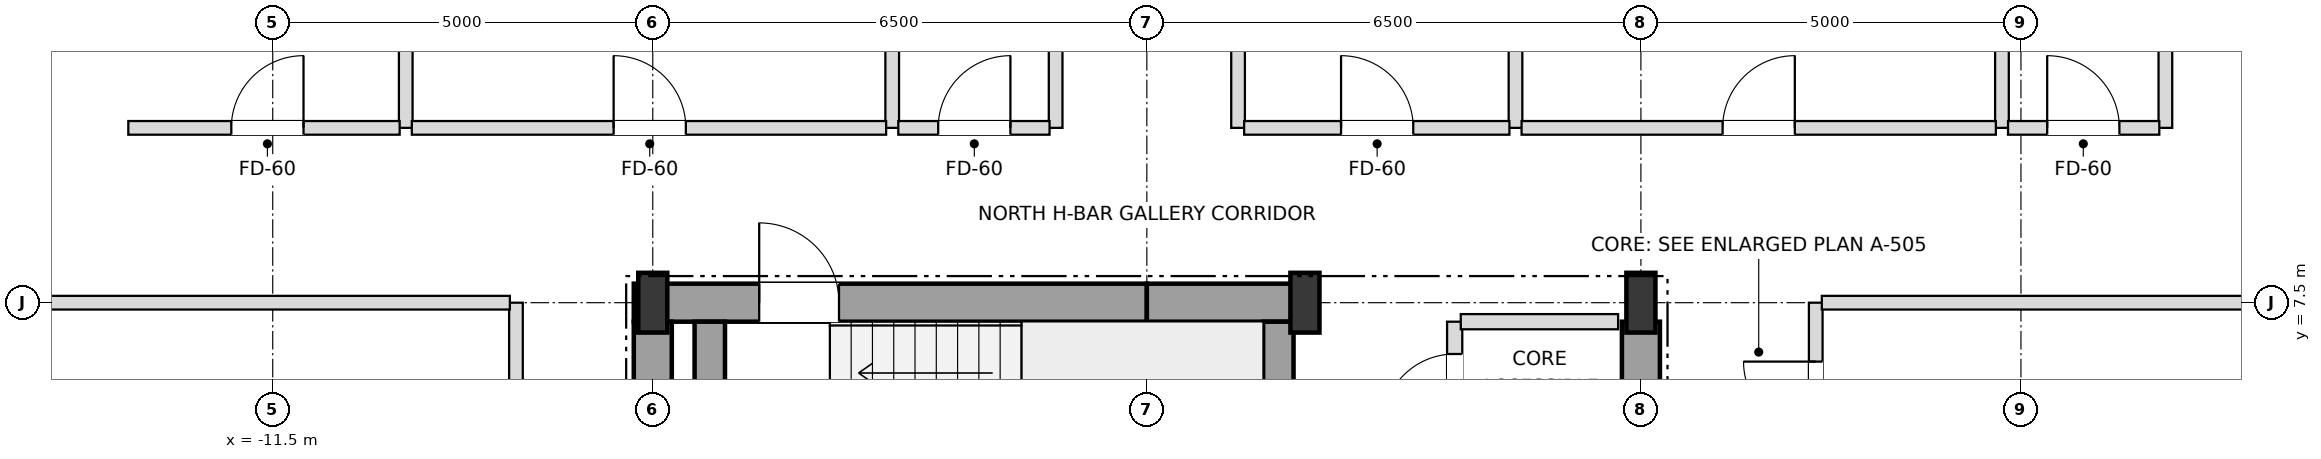
"""IFC4 building model, lengths in metres.
Left out: names, types, materials, properties, quantities, classifications, styles, units other than length and angle.
Written with IfcOpenShell. Run it as: python <this file> out.ifc"""

import sys

from ifc_helpers import new_model, si_unit, direction, frame, frame_2d, origin, origin_2d, place, context, subcontext, project, spatial, rectangle, i_section, extrude, element, fill, save


model = new_model("IFC4")
c1 = context("Model", 3, precision=1e-05, world=origin(), true_north=direction((0.0, 1.0)))
c2 = subcontext(c1, "Body", "Model", "MODEL_VIEW")
j1 = project(units=[si_unit("LENGTHUNIT", "METRE"), si_unit("PLANEANGLEUNIT", "RADIAN")], contexts=[c1])
p1 = place(None, origin())
s1 = spatial("IfcSite", under=j1, at=p1, CompositionType="ELEMENT")
p2 = place(p1, origin())
s2 = spatial("IfcBuilding", under=s1, at=p2, CompositionType="ELEMENT")
p3 = place(p2, frame((0.0, 0.0, 205.2)))
s3 = spatial("IfcBuildingStorey", under=s2, at=p3, CompositionType="ELEMENT", Elevation=205.2)
for number, where, z_axis, x_axis in (
    (1, (-6.5, 7.5, 0.0), (0.0, 0.0, 1.0), (1.0, 0.0, 0.0)),
    (2, (2.08, 7.5, 0.0), (0.0, 0.0, 1.0), (1.0, 0.0, 0.0)),
    (3, (6.5, 7.5, 0.0), (0.0, 0.0, 1.0), (1.0, 0.0, 0.0)),
):
    element("IfcColumn", number, at=place(p3, frame(where, z_axis=z_axis, x_axis=x_axis)), inside=s3, PredefinedType="COLUMN", context=c2, shape_type="SweptSolid", body=[
        extrude(i_section(OverallWidth=0.382, OverallDepth=0.786, WebThickness=0.02, FlangeThickness=0.033, at=origin_2d()), origin(), (0.0, 0.0, 1.0), 3.6),
    ])
p4 = place(p3, frame((-6.75, 7.5, 0.0), z_axis=(0.0, 0.0, 1.0), x_axis=(1.0, 0.0, 0.0)))
e4 = element("IfcWall", 4, at=p4, inside=s3, PredefinedType="SHEAR", context=c2, shape_type="SweptSolid", body=[
    extrude(rectangle(XDim=6.75, YDim=0.5, at=frame_2d((3.375, 0.0))), origin(), (0.0, 0.0, 1.0), 3.38),
])
p5 = place(p4, frame((1.65, 0.0, 0.0)))
e5 = element("IfcOpeningElement", 5, at=p5, cuts=e4, PredefinedType="OPENING", context=c2, shape_type="SweptSolid", body=[
    extrude(rectangle(XDim=1.05, YDim=2.15, at=frame_2d((0.525, 1.075))), frame((0.0, 0.26, 0.0), z_axis=(0.0, -1.0, 0.0), x_axis=(1.0, 0.0, 0.0)), (0.0, 0.0, 1.0), 0.52),
])
p6 = place(p3, frame((0.0, 7.5, 0.0), z_axis=(0.0, 0.0, 1.0), x_axis=(1.0, 0.0, 0.0)))
e6 = element("IfcWall", 6, at=p6, inside=s3, PredefinedType="SHEAR", context=c2, shape_type="SweptSolid", body=[
    extrude(rectangle(XDim=2.08, YDim=0.5, at=frame_2d((1.04, 0.0))), origin(), (0.0, 0.0, 1.0), 3.38),
])
for number, where, z_axis, x_axis in (
    (7, (-6.5, 3.95, 0.0), (0.0, 0.0, 1.0), (0.0, 1.0, 0.0)),
    (8, (6.5, 3.95, 0.0), (0.0, 0.0, 1.0), (0.0, 1.0, 0.0)),
):
    element("IfcWall", number, at=place(p3, frame(where, z_axis=z_axis, x_axis=x_axis)), inside=s3, PredefinedType="SHEAR", context=c2, shape_type="SweptSolid", body=[
        extrude(rectangle(XDim=3.3, YDim=0.5, at=frame_2d((1.65, 0.0))), origin(), (0.0, 0.0, 1.0), 3.38),
    ])
for number, where, z_axis, x_axis in (
    (9, (1.73, 3.95, 0.0), (0.0, 0.0, 1.0), (0.0, 1.0, 0.0)),
    (10, (-5.75, 3.95, 0.0), (0.0, 0.0, 1.0), (0.0, 1.0, 0.0)),
):
    element("IfcWall", number, at=place(p3, frame(where, z_axis=z_axis, x_axis=x_axis)), inside=s3, PredefinedType="SHEAR", context=c2, shape_type="SweptSolid", body=[
        extrude(rectangle(XDim=3.3, YDim=0.4, at=frame_2d((1.65, 0.0))), origin(), (0.0, 0.0, 1.0), 3.38),
    ])
p7 = place(p3, frame((-9.75, 9.8, 0.0), z_axis=(0.0, 0.0, 1.0), x_axis=(0.0, 1.0, 0.0)))
e11 = element("IfcWall", 11, at=p7, inside=s3, PredefinedType="PARTITIONING", context=c2, shape_type="SweptSolid", body=[
    extrude(rectangle(XDim=11.6, YDim=0.18, at=frame_2d((5.8, 0.0))), origin(), (0.0, 0.0, 1.0), 2.826),
])
p8 = place(p3, frame((-8.3, -7.5, 0.0), z_axis=(0.0, 0.0, 1.0), x_axis=(0.0, 1.0, 0.0)))
e12 = element("IfcWall", 12, at=p8, inside=s3, PredefinedType="PARTITIONING", context=c2, shape_type="SweptSolid", body=[
    extrude(rectangle(XDim=15.0, YDim=0.18, at=frame_2d((7.5, 0.0))), origin(), (0.0, 0.0, 1.0), 3.38),
])
p9 = place(p8, frame((0.665, 0.0, 0.0)))
e13 = element("IfcOpeningElement", 13, at=p9, cuts=e12, PredefinedType="OPENING", context=c2, shape_type="SweptSolid", body=[
    extrude(rectangle(XDim=0.95, YDim=2.15, at=frame_2d((0.475, 1.075))), frame((0.0, 0.1, 0.0), z_axis=(0.0, -1.0, 0.0), x_axis=(1.0, 0.0, 0.0)), (0.0, 0.0, 1.0), 0.2),
])
p10 = place(p8, frame((2.665, 0.0, 0.0)))
e14 = element("IfcOpeningElement", 14, at=p10, cuts=e12, PredefinedType="OPENING", context=c2, shape_type="SweptSolid", body=[
    extrude(rectangle(XDim=0.95, YDim=2.15, at=frame_2d((0.475, 1.075))), frame((0.0, 0.1, 0.0), z_axis=(0.0, -1.0, 0.0), x_axis=(1.0, 0.0, 0.0)), (0.0, 0.0, 1.0), 0.2),
])
for number, where, z_axis, x_axis in (
    (15, (-3.35, 9.8, 0.0), (0.0, 0.0, 1.0), (0.0, 1.0, 0.0)),
    (16, (-1.2, 9.8, 0.0), (0.0, 0.0, 1.0), (0.0, 1.0, 0.0)),
    (17, (1.2, 9.8, 0.0), (0.0, 0.0, 1.0), (0.0, 1.0, 0.0)),
):
    element("IfcWall", number, at=place(p3, frame(where, z_axis=z_axis, x_axis=x_axis)), inside=s3, PredefinedType="PARTITIONING", context=c2, shape_type="SweptSolid", body=[
        extrude(rectangle(XDim=11.6, YDim=0.18, at=frame_2d((5.8, 0.0))), origin(), (0.0, 0.0, 1.0), 2.826),
    ])
p11 = place(p3, frame((4.05, 5.55, 0.0), z_axis=(0.0, 0.0, 1.0), x_axis=(0.0, 1.0, 0.0)))
e18 = element("IfcWall", 18, at=p11, inside=s3, PredefinedType="SOLIDWALL", context=c2, shape_type="SweptSolid", body=[
    extrude(rectangle(XDim=1.7, YDim=0.2, at=frame_2d((0.85, 0.0))), origin(), (0.0, 0.0, 1.0), 3.38),
])
p12 = place(p11, frame((0.325, 0.0, 0.0)))
e19 = element("IfcOpeningElement", 19, at=p12, cuts=e18, PredefinedType="OPENING", context=c2, shape_type="SweptSolid", body=[
    extrude(rectangle(XDim=0.95, YDim=2.15, at=frame_2d((0.475, 1.075))), frame((0.0, 0.11, 0.0), z_axis=(0.0, -1.0, 0.0), x_axis=(1.0, 0.0, 0.0)), (0.0, 0.0, 1.0), 0.22),
])
p13 = place(p3, frame((4.85, 9.8, 0.0), z_axis=(0.0, 0.0, 1.0), x_axis=(0.0, 1.0, 0.0)))
e20 = element("IfcWall", 20, at=p13, inside=s3, PredefinedType="PARTITIONING", context=c2, shape_type="SweptSolid", body=[
    extrude(rectangle(XDim=11.6, YDim=0.18, at=frame_2d((5.8, 0.0))), origin(), (0.0, 0.0, 1.0), 2.826),
])
p14 = place(p3, frame((8.8, -7.5, 0.0), z_axis=(0.0, 0.0, 1.0), x_axis=(0.0, 1.0, 0.0)))
e21 = element("IfcWall", 21, at=p14, inside=s3, PredefinedType="PARTITIONING", context=c2, shape_type="SweptSolid", body=[
    extrude(rectangle(XDim=15.0, YDim=0.18, at=frame_2d((7.5, 0.0))), origin(), (0.0, 0.0, 1.0), 3.38),
])
p15 = place(p14, frame((2.075, 0.0, 0.0)))
e22 = element("IfcOpeningElement", 22, at=p15, cuts=e21, PredefinedType="OPENING", context=c2, shape_type="SweptSolid", body=[
    extrude(rectangle(XDim=0.95, YDim=2.15, at=frame_2d((0.475, 1.075))), frame((0.0, 0.1, 0.0), z_axis=(0.0, -1.0, 0.0), x_axis=(1.0, 0.0, 0.0)), (0.0, 0.0, 1.0), 0.2),
])
p16 = place(p14, frame((8.325, 0.0, 0.0)))
e23 = element("IfcOpeningElement", 23, at=p16, cuts=e21, PredefinedType="OPENING", context=c2, shape_type="SweptSolid", body=[
    extrude(rectangle(XDim=0.95, YDim=2.15, at=frame_2d((0.475, 1.075))), frame((0.0, 0.1, 0.0), z_axis=(0.0, -1.0, 0.0), x_axis=(1.0, 0.0, 0.0)), (0.0, 0.0, 1.0), 0.2),
])
p17 = place(p14, frame((13.275, 0.0, 0.0)))
e24 = element("IfcOpeningElement", 24, at=p17, cuts=e21, PredefinedType="OPENING", context=c2, shape_type="SweptSolid", body=[
    extrude(rectangle(XDim=0.95, YDim=2.15, at=frame_2d((0.475, 1.075))), frame((0.0, 0.1, 0.0), z_axis=(0.0, -1.0, 0.0), x_axis=(1.0, 0.0, 0.0)), (0.0, 0.0, 1.0), 0.2),
])
p18 = place(p3, frame((11.25, 9.8, 0.0), z_axis=(0.0, 0.0, 1.0), x_axis=(0.0, 1.0, 0.0)))
e25 = element("IfcWall", 25, at=p18, inside=s3, PredefinedType="PARTITIONING", context=c2, shape_type="SweptSolid", body=[
    extrude(rectangle(XDim=11.6, YDim=0.18, at=frame_2d((5.8, 0.0))), origin(), (0.0, 0.0, 1.0), 2.826),
])
p19 = place(p18, frame((6.925, 0.0, 0.0)))
e26 = element("IfcOpeningElement", 26, at=p19, cuts=e25, PredefinedType="OPENING", context=c2, shape_type="SweptSolid", body=[
    extrude(rectangle(XDim=0.95, YDim=2.15, at=frame_2d((0.475, 1.075))), frame((0.0, 0.1, 0.0), z_axis=(0.0, -1.0, 0.0), x_axis=(1.0, 0.0, 0.0)), (0.0, 0.0, 1.0), 0.2),
])
p20 = place(p3, frame((13.4, 9.8, 0.0), z_axis=(0.0, 0.0, 1.0), x_axis=(0.0, 1.0, 0.0)))
e27 = element("IfcWall", 27, at=p20, inside=s3, PredefinedType="PARTITIONING", context=c2, shape_type="SweptSolid", body=[
    extrude(rectangle(XDim=3.2, YDim=0.18, at=frame_2d((1.6, 0.0))), origin(), (0.0, 0.0, 1.0), 3.38),
])
p21 = place(p3, frame((4.13, 7.25, 0.0), z_axis=(0.0, 0.0, 1.0), x_axis=(1.0, 0.0, 0.0)))
e28 = element("IfcWall", 28, at=p21, inside=s3, PredefinedType="SOLIDWALL", context=c2, shape_type="SweptSolid", body=[
    extrude(rectangle(XDim=2.07, YDim=0.2, at=frame_2d((1.035, 0.0))), origin(), (0.0, 0.0, 1.0), 3.38),
])
p22 = place(p3, frame((-18.4, 7.5, 0.0), z_axis=(0.0, 0.0, 1.0), x_axis=(1.0, 0.0, 0.0)))
e29 = element("IfcWall", 29, at=p22, inside=s3, PredefinedType="PARTITIONING", context=c2, shape_type="SweptSolid", body=[
    extrude(rectangle(XDim=10.02, YDim=0.18, at=frame_2d((5.01, 0.0))), origin(), (0.0, 0.0, 1.0), 2.826),
])
p23 = place(p3, frame((8.88, 7.5, 0.0), z_axis=(0.0, 0.0, 1.0), x_axis=(1.0, 0.0, 0.0)))
e30 = element("IfcWall", 30, at=p23, inside=s3, PredefinedType="PARTITIONING", context=c2, shape_type="SweptSolid", body=[
    extrude(rectangle(XDim=9.52, YDim=0.18, at=frame_2d((4.76, 0.0))), origin(), (0.0, 0.0, 1.0), 2.826),
])
p24 = place(p3, frame((-13.4, 9.8, 0.0), z_axis=(0.0, 0.0, 1.0), x_axis=(1.0, 0.0, 0.0)))
e31 = element("IfcWall", 31, at=p24, inside=s3, PredefinedType="PARTITIONING", context=c2, shape_type="SweptSolid", body=[
    extrude(rectangle(XDim=3.57, YDim=0.18, at=frame_2d((1.785, 0.0))), origin(), (0.0, 0.0, 1.0), 3.38),
])
p25 = place(p24, frame((1.355, 0.0, 0.0)))
e32 = element("IfcOpeningElement", 32, at=p25, cuts=e31, PredefinedType="OPENING", context=c2, shape_type="SweptSolid", body=[
    extrude(rectangle(XDim=0.95, YDim=2.15, at=frame_2d((0.475, 1.075))), frame((0.0, 0.1, 0.0), z_axis=(0.0, -1.0, 0.0), x_axis=(1.0, 0.0, 0.0)), (0.0, 0.0, 1.0), 0.2),
])
p26 = place(p3, frame((-9.67, 9.8, 0.0), z_axis=(0.0, 0.0, 1.0), x_axis=(1.0, 0.0, 0.0)))
e33 = element("IfcWall", 33, at=p26, inside=s3, PredefinedType="PARTITIONING", context=c2, shape_type="SweptSolid", body=[
    extrude(rectangle(XDim=6.24, YDim=0.18, at=frame_2d((3.12, 0.0))), origin(), (0.0, 0.0, 1.0), 2.826),
])
p27 = place(p26, frame((2.655, 0.0, 0.0)))
e34 = element("IfcOpeningElement", 34, at=p27, cuts=e33, PredefinedType="OPENING", context=c2, shape_type="SweptSolid", body=[
    extrude(rectangle(XDim=0.95, YDim=2.15, at=frame_2d((0.475, 1.075))), frame((0.0, 0.1, 0.0), z_axis=(0.0, -1.0, 0.0), x_axis=(1.0, 0.0, 0.0)), (0.0, 0.0, 1.0), 0.2),
])
p28 = place(p3, frame((-3.27, 9.8, 0.0), z_axis=(0.0, 0.0, 1.0), x_axis=(1.0, 0.0, 0.0)))
e35 = element("IfcWall", 35, at=p28, inside=s3, PredefinedType="PARTITIONING", context=c2, shape_type="SweptSolid", body=[
    extrude(rectangle(XDim=1.99, YDim=0.18, at=frame_2d((0.995, 0.0))), origin(), (0.0, 0.0, 1.0), 3.38),
])
p29 = place(p28, frame((0.525, 0.0, 0.0)))
e36 = element("IfcOpeningElement", 36, at=p29, cuts=e35, PredefinedType="OPENING", context=c2, shape_type="SweptSolid", body=[
    extrude(rectangle(XDim=0.95, YDim=2.15, at=frame_2d((0.475, 1.075))), frame((0.0, 0.1, 0.0), z_axis=(0.0, -1.0, 0.0), x_axis=(1.0, 0.0, 0.0)), (0.0, 0.0, 1.0), 0.2),
])
p30 = place(p3, frame((1.28, 9.8, 0.0), z_axis=(0.0, 0.0, 1.0), x_axis=(1.0, 0.0, 0.0)))
e37 = element("IfcWall", 37, at=p30, inside=s3, PredefinedType="PARTITIONING", context=c2, shape_type="SweptSolid", body=[
    extrude(rectangle(XDim=3.49, YDim=0.18, at=frame_2d((1.745, 0.0))), origin(), (0.0, 0.0, 1.0), 3.38),
])
p31 = place(p30, frame((1.275, 0.0, 0.0)))
e38 = element("IfcOpeningElement", 38, at=p31, cuts=e37, PredefinedType="OPENING", context=c2, shape_type="SweptSolid", body=[
    extrude(rectangle(XDim=0.95, YDim=2.15, at=frame_2d((0.475, 1.075))), frame((0.0, 0.1, 0.0), z_axis=(0.0, -1.0, 0.0), x_axis=(1.0, 0.0, 0.0)), (0.0, 0.0, 1.0), 0.2),
])
p32 = place(p3, frame((4.93, 9.8, 0.0), z_axis=(0.0, 0.0, 1.0), x_axis=(1.0, 0.0, 0.0)))
e39 = element("IfcWall", 39, at=p32, inside=s3, PredefinedType="PARTITIONING", context=c2, shape_type="SweptSolid", body=[
    extrude(rectangle(XDim=6.24, YDim=0.18, at=frame_2d((3.12, 0.0))), origin(), (0.0, 0.0, 1.0), 2.826),
])
p33 = place(p32, frame((2.645, 0.0, 0.0)))
e40 = element("IfcOpeningElement", 40, at=p33, cuts=e39, PredefinedType="OPENING", context=c2, shape_type="SweptSolid", body=[
    extrude(rectangle(XDim=0.95, YDim=2.15, at=frame_2d((0.475, 1.075))), frame((0.0, 0.1, 0.0), z_axis=(0.0, -1.0, 0.0), x_axis=(1.0, 0.0, 0.0)), (0.0, 0.0, 1.0), 0.2),
])
p34 = place(p3, frame((11.33, 9.8, 0.0), z_axis=(0.0, 0.0, 1.0), x_axis=(1.0, 0.0, 0.0)))
e41 = element("IfcWall", 41, at=p34, inside=s3, PredefinedType="PARTITIONING", context=c2, shape_type="SweptSolid", body=[
    extrude(rectangle(XDim=1.99, YDim=0.18, at=frame_2d((0.995, 0.0))), origin(), (0.0, 0.0, 1.0), 3.38),
])
p35 = place(p34, frame((0.515, 0.0, 0.0)))
e42 = element("IfcOpeningElement", 42, at=p35, cuts=e41, PredefinedType="OPENING", context=c2, shape_type="SweptSolid", body=[
    extrude(rectangle(XDim=0.95, YDim=2.15, at=frame_2d((0.475, 1.075))), frame((0.0, 0.1, 0.0), z_axis=(0.0, -1.0, 0.0), x_axis=(1.0, 0.0, 0.0)), (0.0, 0.0, 1.0), 0.2),
])
p36 = place(p5, origin())
e43 = element("IfcDoor", 43, at=p36, inside=s3, OperationType="SINGLE_SWING_LEFT", PredefinedType="DOOR", context=c2, shape_type="SweptSolid", body=[
    extrude(rectangle(XDim=1.05, YDim=2.15, at=frame_2d((0.525, 1.075))), frame((0.0, 0.025, 0.0), z_axis=(0.0, -1.0, 0.0), x_axis=(1.0, 0.0, 0.0)), (0.0, 0.0, 1.0), 0.05),
])
fill(e5, e43)
p37 = place(p12, origin())
e44 = element("IfcDoor", 44, at=p37, inside=s3, OperationType="SINGLE_SWING_LEFT", PredefinedType="DOOR", context=c2, shape_type="SweptSolid", body=[
    extrude(rectangle(XDim=0.95, YDim=2.15, at=frame_2d((0.475, 1.075))), frame((0.0, 0.025, 0.0), z_axis=(0.0, -1.0, 0.0), x_axis=(1.0, 0.0, 0.0)), (0.0, 0.0, 1.0), 0.05),
])
fill(e19, e44)
p38 = place(p25, origin())
e45 = element("IfcDoor", 45, at=p38, inside=s3, OperationType="SINGLE_SWING_RIGHT", PredefinedType="DOOR", context=c2, shape_type="SweptSolid", body=[
    extrude(rectangle(XDim=0.95, YDim=2.15, at=frame_2d((0.475, 1.075))), frame((0.0, 0.025, 0.0), z_axis=(0.0, -1.0, 0.0), x_axis=(1.0, 0.0, 0.0)), (0.0, 0.0, 1.0), 0.05),
])
fill(e32, e45)
p39 = place(p27, origin())
e46 = element("IfcDoor", 46, at=p39, inside=s3, OperationType="SINGLE_SWING_LEFT", PredefinedType="DOOR", context=c2, shape_type="SweptSolid", body=[
    extrude(rectangle(XDim=0.95, YDim=2.15, at=frame_2d((0.475, 1.075))), frame((0.0, 0.025, 0.0), z_axis=(0.0, -1.0, 0.0), x_axis=(1.0, 0.0, 0.0)), (0.0, 0.0, 1.0), 0.05),
])
fill(e34, e46)
p40 = place(p29, origin())
e47 = element("IfcDoor", 47, at=p40, inside=s3, OperationType="SINGLE_SWING_RIGHT", PredefinedType="DOOR", context=c2, shape_type="SweptSolid", body=[
    extrude(rectangle(XDim=0.95, YDim=2.15, at=frame_2d((0.475, 1.075))), frame((0.0, 0.025, 0.0), z_axis=(0.0, -1.0, 0.0), x_axis=(1.0, 0.0, 0.0)), (0.0, 0.0, 1.0), 0.05),
])
fill(e36, e47)
p41 = place(p35, origin())
e48 = element("IfcDoor", 48, at=p41, inside=s3, OperationType="SINGLE_SWING_LEFT", PredefinedType="DOOR", context=c2, shape_type="SweptSolid", body=[
    extrude(rectangle(XDim=0.95, YDim=2.15, at=frame_2d((0.475, 1.075))), frame((0.0, 0.025, 0.0), z_axis=(0.0, -1.0, 0.0), x_axis=(1.0, 0.0, 0.0)), (0.0, 0.0, 1.0), 0.05),
])
fill(e42, e48)
p42 = place(p31, origin())
e49 = element("IfcDoor", 49, at=p42, inside=s3, OperationType="SINGLE_SWING_LEFT", PredefinedType="DOOR", context=c2, shape_type="SweptSolid", body=[
    extrude(rectangle(XDim=0.95, YDim=2.15, at=frame_2d((0.475, 1.075))), frame((0.0, 0.025, 0.0), z_axis=(0.0, -1.0, 0.0), x_axis=(1.0, 0.0, 0.0)), (0.0, 0.0, 1.0), 0.05),
])
fill(e38, e49)
p43 = place(p33, origin())
e50 = element("IfcDoor", 50, at=p43, inside=s3, OperationType="SINGLE_SWING_RIGHT", PredefinedType="DOOR", context=c2, shape_type="SweptSolid", body=[
    extrude(rectangle(XDim=0.95, YDim=2.15, at=frame_2d((0.475, 1.075))), frame((0.0, 0.025, 0.0), z_axis=(0.0, -1.0, 0.0), x_axis=(1.0, 0.0, 0.0)), (0.0, 0.0, 1.0), 0.05),
])
fill(e40, e50)
p44 = place(p17, origin())
e51 = element("IfcDoor", 51, at=p44, inside=s3, OperationType="SINGLE_SWING_RIGHT", PredefinedType="DOOR", context=c2, shape_type="SweptSolid", body=[
    extrude(rectangle(XDim=0.95, YDim=2.15, at=frame_2d((0.475, 1.075))), frame((0.0, 0.025, 0.0), z_axis=(0.0, -1.0, 0.0), x_axis=(1.0, 0.0, 0.0)), (0.0, 0.0, 1.0), 0.05),
])
fill(e24, e51)
save(model, sys.argv[1])
